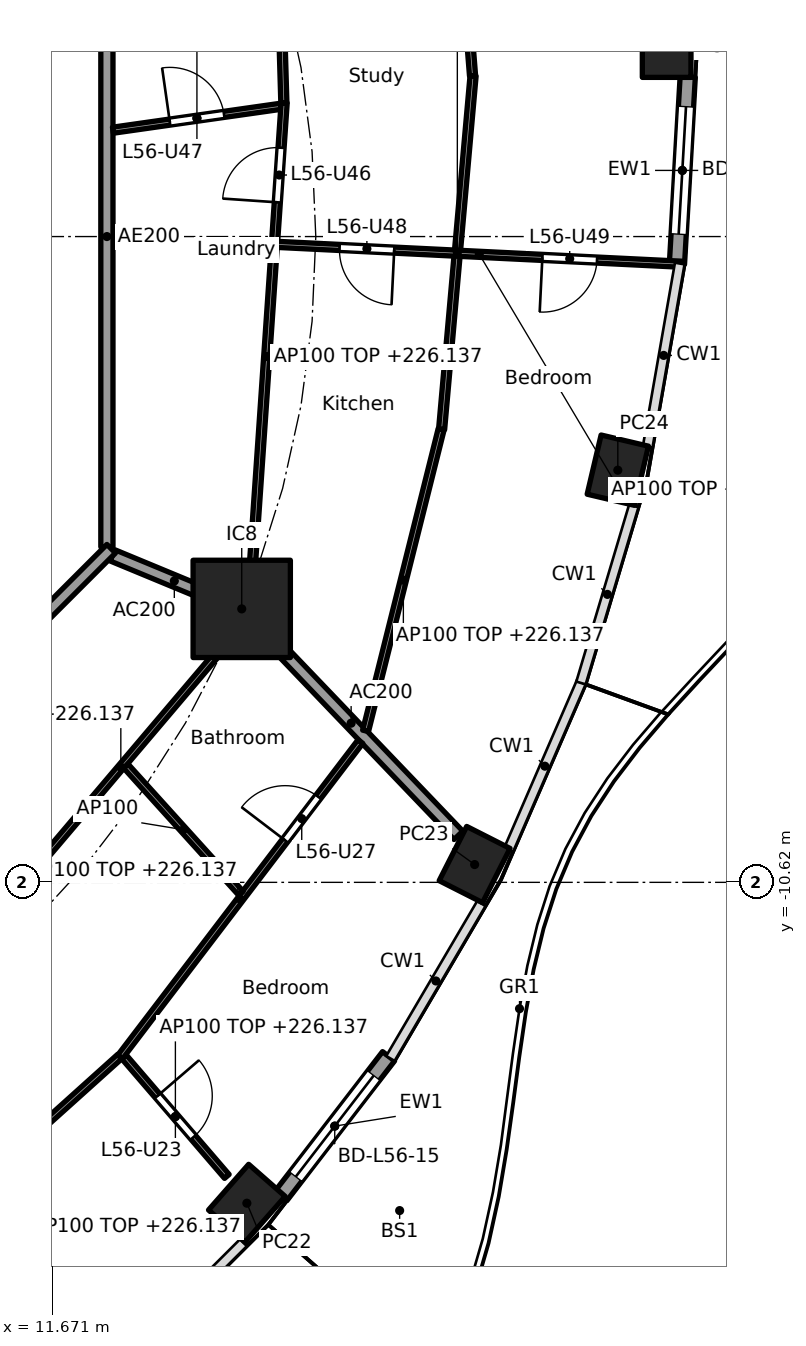
"""IFC4 building model, lengths in metres.
Left out: names, types, materials, properties, quantities, classifications, styles, units other than length and angle.
Written with IfcOpenShell. Run it as: python <this file> out.ifc"""

import sys

from ifc_helpers import new_model, si_unit, direction, frame, frame_2d, origin, origin_2d, place, context, subcontext, project, spatial, rectangle, hollow_rectangle, extrude, element, fill, save


model = new_model("IFC4")
c1 = context("Model", 3, precision=1e-05, world=origin(), true_north=direction((0.0, 1.0)))
c2 = subcontext(c1, "Body", "Model", "MODEL_VIEW")
j1 = project(units=[si_unit("LENGTHUNIT", "METRE"), si_unit("PLANEANGLEUNIT", "RADIAN")], contexts=[c1])
p1 = place(None, origin())
s1 = spatial("IfcSite", under=j1, at=p1, CompositionType="ELEMENT")
p2 = place(p1, origin())
s2 = spatial("IfcBuilding", under=s1, at=p2, CompositionType="ELEMENT")
p3 = place(p2, frame((0.0, 0.0, 223.3)))
s3 = spatial("IfcBuildingStorey", under=s2, at=p3, CompositionType="ELEMENT", Elevation=223.3)
for number, where, z_axis, x_axis in (
    (1, (21.77, 3.118, 0.0), (0.0, 0.0, 1.0), (0.0, 1.0, 0.0)),
    (2, (14.866, -15.896, 0.0), (0.0, 0.0, 1.0), (0.66, 0.751, 0.0)),
    (3, (18.612, -10.327, 0.0), (0.0, 0.0, 1.0), (0.452, 0.892, 0.0)),
    (4, (20.967, -3.842, 0.0), (0.0, 0.0, 1.0), (0.229, 0.973, 0.0)),
):
    element("IfcColumn", number, at=place(p3, frame(where, z_axis=z_axis, x_axis=x_axis)), inside=s3, PredefinedType="COLUMN", context=c2, shape_type="SweptSolid", body=[
        extrude(hollow_rectangle(XDim=1.0, YDim=0.8, WallThickness=0.032, at=origin_2d()), origin(), (0.0, 0.0, 1.0), 3.7),
    ])
p4 = place(p3, frame((14.782, -6.123, 0.0), z_axis=(0.0, 0.0, 1.0), x_axis=(1.0, 0.0, 0.0)))
e5 = element("IfcColumn", 5, at=p4, inside=s3, PredefinedType="COLUMN", context=c2, shape_type="SweptSolid", body=[
    extrude(rectangle(XDim=1.6, YDim=1.6, at=origin_2d()), origin(), (0.0, 0.0, 1.0), 3.7),
])
p5 = place(p3, frame((17.197, -13.48, 0.0), z_axis=(0.0, 0.0, 1.0), x_axis=(-0.610438565676, -0.792063607001, 0.0)))
e6 = element("IfcWall", 6, at=p5, inside=s3, PredefinedType="SOLIDWALL", context=c2, shape_type="SweptSolid", body=[
    extrude(rectangle(XDim=2.901, YDim=0.25, at=frame_2d((1.45, 0.0))), origin(), (0.0, 0.0, 1.0), 3.44),
])
p6 = place(p5, frame((0.4, 0.0, 0.0)))
e7 = element("IfcOpeningElement", 7, at=p6, cuts=e6, PredefinedType="OPENING", context=c2, shape_type="SweptSolid", body=[
    extrude(rectangle(XDim=2.1, YDim=2.4, at=frame_2d((1.05, 1.2))), frame((0.0, 0.135, 0.0), z_axis=(0.0, -1.0, 0.0), x_axis=(1.0, 0.0, 0.0)), (0.0, 0.0, 1.0), 0.27),
])
p7 = place(p3, frame((22.116, 2.626, 0.0), z_axis=(0.0, 0.0, 1.0), x_axis=(-0.057528189427, -0.998343882348, 0.0)))
e8 = element("IfcWall", 8, at=p7, inside=s3, PredefinedType="SOLIDWALL", context=c2, shape_type="SweptSolid", body=[
    extrude(rectangle(XDim=3.081, YDim=0.25, at=frame_2d((1.541, 0.0))), origin(), (0.0, 0.0, 1.0), 3.44),
])
p8 = place(p7, frame((0.49, 0.0, 0.0)))
e9 = element("IfcOpeningElement", 9, at=p8, cuts=e8, PredefinedType="OPENING", context=c2, shape_type="SweptSolid", body=[
    extrude(rectangle(XDim=2.1, YDim=2.4, at=frame_2d((1.05, 1.2))), frame((0.0, 0.135, 0.0), z_axis=(0.0, -1.0, 0.0), x_axis=(1.0, 0.0, 0.0)), (0.0, 0.0, 1.0), 0.27),
])
p9 = place(p3, frame((12.657, -5.243, 0.0), z_axis=(0.0, 0.0, 1.0), x_axis=(0.923853160736, -0.382747093259, 0.0)))
e10 = element("IfcWall", 10, at=p9, inside=s3, PredefinedType="PARTITIONING", context=c2, shape_type="SweptSolid", body=[
    extrude(rectangle(XDim=2.2, YDim=0.2, at=frame_2d((1.1, 0.0))), origin(), (0.0, 0.0, 1.0), 3.44),
])
p10 = place(p3, frame((14.817, -6.159, 0.0), z_axis=(0.0, 0.0, 1.0), x_axis=(0.691437669875, -0.722436120828, 0.0)))
e11 = element("IfcWall", 11, at=p10, inside=s3, PredefinedType="PARTITIONING", context=c2, shape_type="SweptSolid", body=[
    extrude(rectangle(XDim=5.104, YDim=0.2, at=frame_2d((2.552, 0.0))), origin(), (0.0, 0.0, 1.0), 3.44),
])
p11 = place(p3, frame((12.565, -5.104, 0.0), z_axis=(0.0, 0.0, 1.0), x_axis=(0.0, 1.0, 0.0)))
e12 = element("IfcWall", 12, at=p11, inside=s3, PredefinedType="PARTITIONING", context=c2, shape_type="SweptSolid", body=[
    extrude(rectangle(XDim=10.209, YDim=0.2, at=frame_2d((5.104, 0.0))), origin(), (0.0, 0.0, 1.0), 3.44),
])
p12 = place(p3, frame((5.275, -12.494, 0.0), z_axis=(0.0, 0.0, 1.0), x_axis=(0.707106781187, 0.707106781187, 0.0)))
e13 = element("IfcWall", 13, at=p12, inside=s3, PredefinedType="PARTITIONING", context=c2, shape_type="SweptSolid", body=[
    extrude(rectangle(XDim=10.409, YDim=0.2, at=frame_2d((5.205, 0.0))), origin(), (0.0, 0.0, 1.0), 3.44),
])
p13 = place(p3, frame((12.664, 1.749, 0.0), z_axis=(0.0, 0.0, 1.0), x_axis=(0.990007147727, 0.14101718849, 0.0)))
e14 = element("IfcWall", 14, at=p13, inside=s3, PredefinedType="PARTITIONING", context=c2, shape_type="SweptSolid", body=[
    extrude(rectangle(XDim=2.791, YDim=0.1, at=frame_2d((1.396, 0.0))), origin(), (0.0, 0.0, 1.0), 2.762),
])
p14 = place(p13, frame((0.946, 0.0, 0.0)))
e15 = element("IfcOpeningElement", 15, at=p14, cuts=e14, PredefinedType="OPENING", context=c2, shape_type="SweptSolid", body=[
    extrude(rectangle(XDim=0.9, YDim=2.1, at=frame_2d((0.45, 1.05))), frame((0.0, 0.06, 0.0), z_axis=(0.0, -1.0, 0.0), x_axis=(1.0, 0.0, 0.0)), (0.0, 0.0, 1.0), 0.12),
])
p15 = place(p3, frame((15.475, 2.2, 0.0), z_axis=(0.0, 0.0, 1.0), x_axis=(-0.029254637498, 0.999571991497, 0.0)))
e16 = element("IfcWall", 16, at=p15, inside=s3, PredefinedType="PARTITIONING", context=c2, shape_type="SweptSolid", body=[
    extrude(rectangle(XDim=4.223, YDim=0.1, at=frame_2d((2.111, 0.0))), origin(), (0.0, 0.0, 1.0), 2.837),
])
p16 = place(p3, frame((15.48, 2.199, 0.0), z_axis=(0.0, 0.0, 1.0), x_axis=(-0.068558685949, -0.997647085186, 0.0)))
e17 = element("IfcWall", 17, at=p16, inside=s3, PredefinedType="PARTITIONING", context=c2, shape_type="SweptSolid", body=[
    extrude(rectangle(XDim=8.365, YDim=0.1, at=frame_2d((4.183, 0.0))), origin(), (0.0, 0.0, 1.0), 2.837),
])
p17 = place(p16, frame((0.74, 0.0, 0.0)))
e18 = element("IfcOpeningElement", 18, at=p17, cuts=e17, PredefinedType="OPENING", context=c2, shape_type="SweptSolid", body=[
    extrude(rectangle(XDim=0.9, YDim=2.1, at=frame_2d((0.45, 1.05))), frame((0.0, 0.06, 0.0), z_axis=(0.0, -1.0, 0.0), x_axis=(1.0, 0.0, 0.0)), (0.0, 0.0, 1.0), 0.12),
])
p18 = place(p3, frame((18.578, 2.642, 0.0), z_axis=(0.0, 0.0, 1.0), x_axis=(-0.079179272956, 0.9968603928, 0.0)))
e19 = element("IfcWall", 19, at=p18, inside=s3, PredefinedType="PARTITIONING", context=c2, shape_type="SweptSolid", body=[
    extrude(rectangle(XDim=5.504, YDim=0.1, at=frame_2d((2.752, 0.0))), origin(), (0.0, 0.0, 1.0), 2.837),
])
p19 = place(p18, frame((2.302, 0.0, 0.0)))
e20 = element("IfcOpeningElement", 20, at=p19, cuts=e19, PredefinedType="OPENING", context=c2, shape_type="SweptSolid", body=[
    extrude(rectangle(XDim=0.9, YDim=2.1, at=frame_2d((0.45, 1.05))), frame((0.0, 0.06, 0.0), z_axis=(0.0, -1.0, 0.0), x_axis=(1.0, 0.0, 0.0)), (0.0, 0.0, 1.0), 0.12),
])
p20 = place(p3, frame((18.586, 2.642, 0.0), z_axis=(0.0, 0.0, 1.0), x_axis=(-0.088638473361, -0.996063863937, 0.0)))
e21 = element("IfcWall", 21, at=p20, inside=s3, PredefinedType="PARTITIONING", context=c2, shape_type="SweptSolid", body=[
    extrude(rectangle(XDim=5.836, YDim=0.1, at=frame_2d((2.918, 0.0))), origin(), (0.0, 0.0, 1.0), 2.837),
])
p21 = place(p3, frame((8.109, -17.679, 0.0), z_axis=(0.0, 0.0, 1.0), x_axis=(0.743675165651, 0.668541134108, 0.0)))
e22 = element("IfcWall", 22, at=p21, inside=s3, PredefinedType="PARTITIONING", context=c2, shape_type="SweptSolid", body=[
    extrude(rectangle(XDim=6.275, YDim=0.1, at=frame_2d((3.137, 0.0))), origin(), (0.0, 0.0, 1.0), 2.837),
])
p22 = place(p21, frame((2.712, 0.0, 0.0)))
e23 = element("IfcOpeningElement", 23, at=p22, cuts=e22, PredefinedType="OPENING", context=c2, shape_type="SweptSolid", body=[
    extrude(rectangle(XDim=0.9, YDim=2.1, at=frame_2d((0.45, 1.05))), frame((0.0, 0.06, 0.0), z_axis=(0.0, -1.0, 0.0), x_axis=(1.0, 0.0, 0.0)), (0.0, 0.0, 1.0), 0.12),
])
p23 = place(p3, frame((10.753, -11.132, 0.0), z_axis=(0.0, 0.0, 1.0), x_axis=(0.646987675252, 0.762500457752, 0.0)))
e24 = element("IfcWall", 24, at=p23, inside=s3, PredefinedType="PARTITIONING", context=c2, shape_type="SweptSolid", body=[
    extrude(rectangle(XDim=6.309, YDim=0.1, at=frame_2d((3.154, 0.0))), origin(), (0.0, 0.0, 1.0), 2.837),
])
p24 = place(p3, frame((12.845, -13.489, 0.0), z_axis=(0.0, 0.0, 1.0), x_axis=(0.652092276587, -0.758139606416, 0.0)))
e25 = element("IfcWall", 25, at=p24, inside=s3, PredefinedType="PARTITIONING", context=c2, shape_type="SweptSolid", body=[
    extrude(rectangle(XDim=2.594, YDim=0.1, at=frame_2d((1.297, 0.0))), origin(), (0.0, 0.0, 1.0), 2.837),
])
p25 = place(p24, frame((0.847, 0.0, 0.0)))
e26 = element("IfcOpeningElement", 26, at=p25, cuts=e25, PredefinedType="OPENING", context=c2, shape_type="SweptSolid", body=[
    extrude(rectangle(XDim=0.9, YDim=2.1, at=frame_2d((0.45, 1.05))), frame((0.0, 0.06, 0.0), z_axis=(0.0, -1.0, 0.0), x_axis=(1.0, 0.0, 0.0)), (0.0, 0.0, 1.0), 0.12),
])
p26 = place(p3, frame((12.782, -13.491, 0.0), z_axis=(0.0, 0.0, 1.0), x_axis=(0.606141365852, 0.79535692906, 0.0)))
e27 = element("IfcWall", 27, at=p26, inside=s3, PredefinedType="PARTITIONING", context=c2, shape_type="SweptSolid", body=[
    extrude(rectangle(XDim=6.52, YDim=0.1, at=frame_2d((3.26, 0.0))), origin(), (0.0, 0.0, 1.0), 2.837),
])
p27 = place(p26, frame((4.477, 0.0, 0.0)))
e28 = element("IfcOpeningElement", 28, at=p27, cuts=e27, PredefinedType="OPENING", context=c2, shape_type="SweptSolid", body=[
    extrude(rectangle(XDim=0.9, YDim=2.1, at=frame_2d((0.45, 1.05))), frame((0.0, 0.06, 0.0), z_axis=(0.0, -1.0, 0.0), x_axis=(1.0, 0.0, 0.0)), (0.0, 0.0, 1.0), 0.12),
])
p28 = place(p3, frame((12.876, -8.707, 0.0), z_axis=(0.0, 0.0, 1.0), x_axis=(0.670768418052, -0.741666858733, 0.0)))
e29 = element("IfcWall", 29, at=p28, inside=s3, PredefinedType="PARTITIONING", context=c2, shape_type="SweptSolid", body=[
    extrude(rectangle(XDim=2.824, YDim=0.1, at=frame_2d((1.412, 0.0))), origin(), (0.0, 0.0, 1.0), 3.44),
])
p29 = place(p3, frame((16.819, -8.129, 0.0), z_axis=(0.0, 0.0, 1.0), x_axis=(0.243041266705, 0.970015949703, 0.0)))
e30 = element("IfcWall", 30, at=p29, inside=s3, PredefinedType="PARTITIONING", context=c2, shape_type="SweptSolid", body=[
    extrude(rectangle(XDim=5.112, YDim=0.1, at=frame_2d((2.556, 0.0))), origin(), (0.0, 0.0, 1.0), 2.837),
])
p30 = place(p3, frame((15.353, -0.128, 0.0), z_axis=(0.0, 0.0, 1.0), x_axis=(0.99879606888, -0.049055201451, 0.0)))
e31 = element("IfcWall", 31, at=p30, inside=s3, PredefinedType="PARTITIONING", context=c2, shape_type="SweptSolid", body=[
    extrude(rectangle(XDim=6.679, YDim=0.1, at=frame_2d((3.339, 0.0))), origin(), (0.0, 0.0, 1.0), 2.983),
])
p31 = place(p30, frame((1.039, 0.0, 0.0)))
e32 = element("IfcOpeningElement", 32, at=p31, cuts=e31, PredefinedType="OPENING", context=c2, shape_type="SweptSolid", body=[
    extrude(rectangle(XDim=0.9, YDim=2.1, at=frame_2d((0.45, 1.05))), frame((0.0, 0.06, 0.0), z_axis=(0.0, -1.0, 0.0), x_axis=(1.0, 0.0, 0.0)), (0.0, 0.0, 1.0), 0.12),
])
p32 = place(p30, frame((4.378, 0.0, 0.0)))
e33 = element("IfcOpeningElement", 33, at=p32, cuts=e31, PredefinedType="OPENING", context=c2, shape_type="SweptSolid", body=[
    extrude(rectangle(XDim=0.9, YDim=2.1, at=frame_2d((0.45, 1.05))), frame((0.0, 0.06, 0.0), z_axis=(0.0, -1.0, 0.0), x_axis=(1.0, 0.0, 0.0)), (0.0, 0.0, 1.0), 0.12),
])
p33 = place(p6, origin())
e34 = element("IfcDoor", 34, at=p33, inside=s3, OperationType="SLIDING_TO_LEFT", PredefinedType="DOOR", context=c2, shape_type="SweptSolid", body=[
    extrude(rectangle(XDim=2.1, YDim=2.4, at=frame_2d((1.05, 1.2))), frame((0.0, 0.025, 0.0), z_axis=(0.0, -1.0, 0.0), x_axis=(1.0, 0.0, 0.0)), (0.0, 0.0, 1.0), 0.05),
])
fill(e7, e34)
p34 = place(p8, origin())
e35 = element("IfcDoor", 35, at=p34, inside=s3, OperationType="SLIDING_TO_LEFT", PredefinedType="DOOR", context=c2, shape_type="SweptSolid", body=[
    extrude(rectangle(XDim=2.1, YDim=2.4, at=frame_2d((1.05, 1.2))), frame((0.0, 0.025, 0.0), z_axis=(0.0, -1.0, 0.0), x_axis=(1.0, 0.0, 0.0)), (0.0, 0.0, 1.0), 0.05),
])
fill(e9, e35)
p35 = place(p25, origin())
e36 = element("IfcDoor", 36, at=p35, inside=s3, OperationType="SINGLE_SWING_LEFT", PredefinedType="DOOR", context=c2, shape_type="SweptSolid", body=[
    extrude(rectangle(XDim=0.9, YDim=2.1, at=frame_2d((0.45, 1.05))), frame((0.0, 0.025, 0.0), z_axis=(0.0, -1.0, 0.0), x_axis=(1.0, 0.0, 0.0)), (0.0, 0.0, 1.0), 0.05),
])
fill(e26, e36)
p36 = place(p27, origin())
e37 = element("IfcDoor", 37, at=p36, inside=s3, OperationType="SINGLE_SWING_LEFT", PredefinedType="DOOR", context=c2, shape_type="SweptSolid", body=[
    extrude(rectangle(XDim=0.9, YDim=2.1, at=frame_2d((0.45, 1.05))), frame((0.0, 0.025, 0.0), z_axis=(0.0, -1.0, 0.0), x_axis=(1.0, 0.0, 0.0)), (0.0, 0.0, 1.0), 0.05),
])
fill(e28, e37)
p37 = place(p17, frame((0.9, 0.0, 0.0), x_axis=(-1.0, 0.0, 0.0)))
e38 = element("IfcDoor", 38, at=p37, inside=s3, OperationType="SINGLE_SWING_LEFT", PredefinedType="DOOR", context=c2, shape_type="SweptSolid", body=[
    extrude(rectangle(XDim=0.9, YDim=2.1, at=frame_2d((0.45, 1.05))), frame((0.0, 0.025, 0.0), z_axis=(0.0, -1.0, 0.0), x_axis=(1.0, 0.0, 0.0)), (0.0, 0.0, 1.0), 0.05),
])
fill(e18, e38)
p38 = place(p14, origin())
e39 = element("IfcDoor", 39, at=p38, inside=s3, OperationType="SINGLE_SWING_LEFT", PredefinedType="DOOR", context=c2, shape_type="SweptSolid", body=[
    extrude(rectangle(XDim=0.9, YDim=2.1, at=frame_2d((0.45, 1.05))), frame((0.0, 0.025, 0.0), z_axis=(0.0, -1.0, 0.0), x_axis=(1.0, 0.0, 0.0)), (0.0, 0.0, 1.0), 0.05),
])
fill(e15, e39)
p39 = place(p31, frame((0.9, 0.0, 0.0), x_axis=(-1.0, 0.0, 0.0)))
e40 = element("IfcDoor", 40, at=p39, inside=s3, OperationType="SINGLE_SWING_LEFT", PredefinedType="DOOR", context=c2, shape_type="SweptSolid", body=[
    extrude(rectangle(XDim=0.9, YDim=2.1, at=frame_2d((0.45, 1.05))), frame((0.0, 0.025, 0.0), z_axis=(0.0, -1.0, 0.0), x_axis=(1.0, 0.0, 0.0)), (0.0, 0.0, 1.0), 0.05),
])
fill(e32, e40)
p40 = place(p32, frame((0.9, 0.0, 0.0), x_axis=(-1.0, 0.0, 0.0)))
e41 = element("IfcDoor", 41, at=p40, inside=s3, OperationType="SINGLE_SWING_RIGHT", PredefinedType="DOOR", context=c2, shape_type="SweptSolid", body=[
    extrude(rectangle(XDim=0.9, YDim=2.1, at=frame_2d((0.45, 1.05))), frame((0.0, 0.025, 0.0), z_axis=(0.0, -1.0, 0.0), x_axis=(1.0, 0.0, 0.0)), (0.0, 0.0, 1.0), 0.05),
])
fill(e33, e41)
save(model, sys.argv[1])
